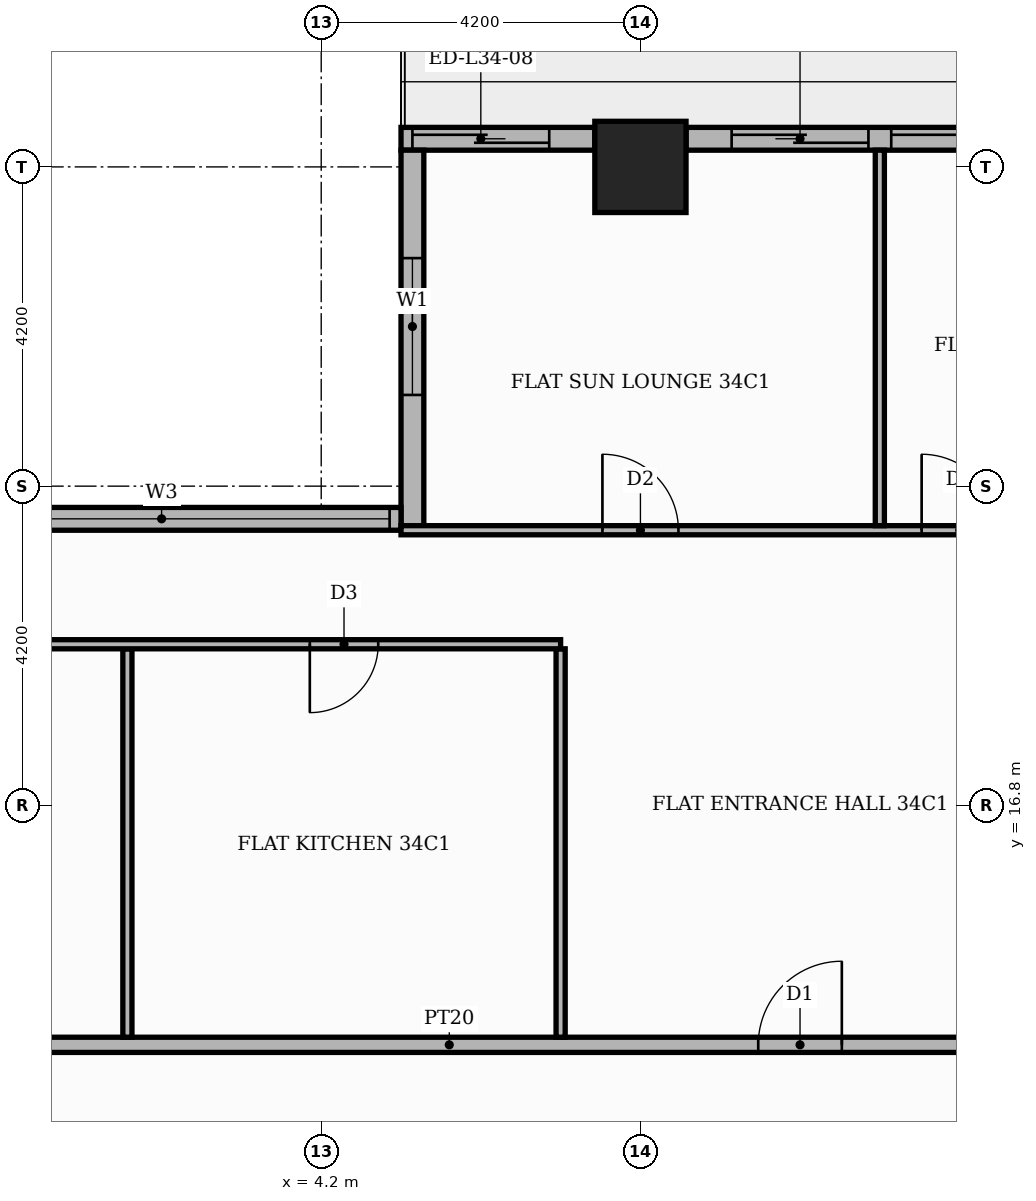
"""IFC4 building model, lengths in metres.
Left out: names, types, materials, properties, quantities, classifications, styles, units other than length and angle.
Written with IfcOpenShell. Run it as: python <this file> out.ifc"""

import sys

from ifc_helpers import new_model, si_unit, direction, frame, frame_2d, origin, origin_2d, place, context, subcontext, project, spatial, rectangle, extrude, element, fill, save


model = new_model("IFC4")
c1 = context("Model", 3, precision=1e-05, world=origin(), true_north=direction((0.0, 1.0)))
c2 = subcontext(c1, "Body", "Model", "MODEL_VIEW")
j1 = project(units=[si_unit("LENGTHUNIT", "METRE"), si_unit("PLANEANGLEUNIT", "RADIAN")], contexts=[c1])
p1 = place(None, origin())
s1 = spatial("IfcSite", under=j1, at=p1, CompositionType="ELEMENT")
p2 = place(p1, origin())
s2 = spatial("IfcBuilding", under=s1, at=p2, CompositionType="ELEMENT")
p3 = place(p2, frame((0.0, 0.0, 145.5)))
s3 = spatial("IfcBuildingStorey", under=s2, at=p3, CompositionType="ELEMENT", Elevation=145.5)
p4 = place(p3, frame((8.4, 25.2, 0.0), z_axis=(0.0, 0.0, 1.0), x_axis=(1.0, 0.0, 0.0)))
e1 = element("IfcColumn", 1, at=p4, inside=s3, PredefinedType="COLUMN", context=c2, shape_type="SweptSolid", body=[
    extrude(rectangle(XDim=1.2, YDim=1.2, at=origin_2d()), origin(), (0.0, 0.0, 1.0), 3.9),
])
p5 = place(p3, frame((16.2, 25.57, 0.0), z_axis=(0.0, 0.0, 1.0), x_axis=(-1.0, 0.0, 0.0)))
e2 = element("IfcWall", 2, at=p5, inside=s3, PredefinedType="STANDARD", context=c2, shape_type="SweptSolid", body=[
    extrude(rectangle(XDim=7.2, YDim=0.3, at=frame_2d((3.6, 0.0))), origin(), (0.0, 0.0, 1.0), 3.48),
])
p6 = place(p5, frame((0.6, 0.0, 0.0)))
e3 = element("IfcOpeningElement", 3, at=p6, cuts=e2, PredefinedType="OPENING", context=c2, shape_type="SweptSolid", body=[
    extrude(rectangle(XDim=3.9, YDim=2.4, at=frame_2d((1.95, 1.2))), frame((0.0, 0.16, 0.0), z_axis=(0.0, -1.0, 0.0), x_axis=(1.0, 0.0, 0.0)), (0.0, 0.0, 1.0), 0.32),
])
p7 = place(p5, frame((4.8, 0.0, 0.0)))
e4 = element("IfcOpeningElement", 4, at=p7, cuts=e2, PredefinedType="OPENING", context=c2, shape_type="SweptSolid", body=[
    extrude(rectangle(XDim=1.8, YDim=2.4, at=frame_2d((0.9, 1.2))), frame((0.0, 0.16, 0.0), z_axis=(0.0, -1.0, 0.0), x_axis=(1.0, 0.0, 0.0)), (0.0, 0.0, 1.0), 0.32),
])
p8 = place(p3, frame((7.8, 25.57, 0.0), z_axis=(0.0, 0.0, 1.0), x_axis=(-1.0, 0.0, 0.0)))
e5 = element("IfcWall", 5, at=p8, inside=s3, PredefinedType="STANDARD", context=c2, shape_type="SweptSolid", body=[
    extrude(rectangle(XDim=2.55, YDim=0.3, at=frame_2d((1.275, 0.0))), origin(), (0.0, 0.0, 1.0), 3.48),
])
p9 = place(p8, frame((0.6, 0.0, 0.0)))
e6 = element("IfcOpeningElement", 6, at=p9, cuts=e5, PredefinedType="OPENING", context=c2, shape_type="SweptSolid", body=[
    extrude(rectangle(XDim=1.8, YDim=2.4, at=frame_2d((0.9, 1.2))), frame((0.0, 0.16, 0.0), z_axis=(0.0, -1.0, 0.0), x_axis=(1.0, 0.0, 0.0)), (0.0, 0.0, 1.0), 0.32),
])
p10 = place(p3, frame((5.4, 25.42, 0.0), z_axis=(0.0, 0.0, 1.0), x_axis=(0.0, -1.0, 0.0)))
e7 = element("IfcWall", 7, at=p10, inside=s3, PredefinedType="STANDARD", context=c2, shape_type="SweptSolid", body=[
    extrude(rectangle(XDim=5.0, YDim=0.3, at=frame_2d((2.5, 0.0))), origin(), (0.0, 0.0, 1.0), 3.48),
])
p11 = place(p10, frame((1.42, 0.0, 0.9)))
e8 = element("IfcOpeningElement", 8, at=p11, cuts=e7, PredefinedType="OPENING", context=c2, shape_type="SweptSolid", body=[
    extrude(rectangle(XDim=1.8, YDim=2.1, at=frame_2d((0.9, 1.05))), frame((0.0, 0.16, 0.0), z_axis=(0.0, -1.0, 0.0), x_axis=(1.0, 0.0, 0.0)), (0.0, 0.0, 1.0), 0.32),
])
p12 = place(p3, frame((5.25, 20.57, 0.0), z_axis=(0.0, 0.0, 1.0), x_axis=(-1.0, 0.0, 0.0)))
e9 = element("IfcWall", 9, at=p12, inside=s3, PredefinedType="STANDARD", context=c2, shape_type="SweptSolid", body=[
    extrude(rectangle(XDim=10.8, YDim=0.3, at=frame_2d((5.4, 0.0))), origin(), (0.0, 0.0, 1.0), 3.48),
])
p13 = place(p12, frame((0.15, 0.0, 0.9)))
e10 = element("IfcOpeningElement", 10, at=p13, cuts=e9, PredefinedType="OPENING", context=c2, shape_type="SweptSolid", body=[
    extrude(rectangle(XDim=6.0, YDim=2.1, at=frame_2d((3.0, 1.05))), frame((0.0, 0.16, 0.0), z_axis=(0.0, -1.0, 0.0), x_axis=(1.0, 0.0, 0.0)), (0.0, 0.0, 1.0), 0.32),
])
p14 = place(p12, frame((6.45, 0.0, 0.9)))
e11 = element("IfcOpeningElement", 11, at=p14, cuts=e9, PredefinedType="OPENING", context=c2, shape_type="SweptSolid", body=[
    extrude(rectangle(XDim=3.9, YDim=2.1, at=frame_2d((1.95, 1.05))), frame((0.0, 0.16, 0.0), z_axis=(0.0, -1.0, 0.0), x_axis=(1.0, 0.0, 0.0)), (0.0, 0.0, 1.0), 0.32),
])
p15 = place(p3, frame((-13.65, 13.65, 0.0), z_axis=(0.0, 0.0, 1.0), x_axis=(1.0, 0.0, 0.0)))
e12 = element("IfcWall", 12, at=p15, inside=s3, PredefinedType="PARTITIONING", context=c2, shape_type="SweptSolid", body=[
    extrude(rectangle(XDim=39.07, YDim=0.2, at=frame_2d((19.535, 0.0))), origin(), (0.0, 0.0, 1.0), 3.48),
])
p16 = place(p15, frame((23.6, 0.0, 0.0)))
e13 = element("IfcOpeningElement", 13, at=p16, cuts=e12, PredefinedType="OPENING", context=c2, shape_type="SweptSolid", body=[
    extrude(rectangle(XDim=1.1, YDim=2.4, at=frame_2d((0.55, 1.2))), frame((0.0, 0.11, 0.0), z_axis=(0.0, -1.0, 0.0), x_axis=(1.0, 0.0, 0.0)), (0.0, 0.0, 1.0), 0.22),
])
for number, where, z_axis, x_axis in (
    (14, (1.65, 13.75, 0.0), (0.0, 0.0, 1.0), (0.0, 1.0, 0.0)),
    (15, (7.35, 13.75, 0.0), (0.0, 0.0, 1.0), (0.0, 1.0, 0.0)),
):
    element("IfcWall", number, at=place(p3, frame(where, z_axis=z_axis, x_axis=x_axis)), inside=s3, PredefinedType="PARTITIONING", context=c2, shape_type="SweptSolid", body=[
        extrude(rectangle(XDim=5.11, YDim=0.12, at=frame_2d((2.555, 0.0))), origin(), (0.0, 0.0, 1.0), 3.48),
    ])
p17 = place(p3, frame((-13.55, 18.92, 0.0), z_axis=(0.0, 0.0, 1.0), x_axis=(1.0, 0.0, 0.0)))
e16 = element("IfcWall", 16, at=p17, inside=s3, PredefinedType="PARTITIONING", context=c2, shape_type="SweptSolid", body=[
    extrude(rectangle(XDim=20.9, YDim=0.12, at=frame_2d((10.45, 0.0))), origin(), (0.0, 0.0, 1.0), 3.48),
])
p18 = place(p17, frame((17.6, 0.0, 0.0)))
e17 = element("IfcOpeningElement", 17, at=p18, cuts=e16, PredefinedType="OPENING", context=c2, shape_type="SweptSolid", body=[
    extrude(rectangle(XDim=0.9, YDim=2.1, at=frame_2d((0.45, 1.05))), frame((0.0, 0.07, 0.0), z_axis=(0.0, -1.0, 0.0), x_axis=(1.0, 0.0, 0.0)), (0.0, 0.0, 1.0), 0.14),
])
p19 = place(p17, frame((11.3, 0.0, 0.0)))
e18 = element("IfcOpeningElement", 18, at=p19, cuts=e16, PredefinedType="OPENING", context=c2, shape_type="SweptSolid", body=[
    extrude(rectangle(XDim=0.9, YDim=2.1, at=frame_2d((0.45, 1.05))), frame((0.0, 0.07, 0.0), z_axis=(0.0, -1.0, 0.0), x_axis=(1.0, 0.0, 0.0)), (0.0, 0.0, 1.0), 0.14),
])
p20 = place(p17, frame((6.65, 0.0, 0.0)))
e19 = element("IfcOpeningElement", 19, at=p20, cuts=e16, PredefinedType="OPENING", context=c2, shape_type="SweptSolid", body=[
    extrude(rectangle(XDim=0.9, YDim=2.1, at=frame_2d((0.45, 1.05))), frame((0.0, 0.07, 0.0), z_axis=(0.0, -1.0, 0.0), x_axis=(1.0, 0.0, 0.0)), (0.0, 0.0, 1.0), 0.14),
])
p21 = place(p17, frame((3.8, 0.0, 0.0)))
e20 = element("IfcOpeningElement", 20, at=p21, cuts=e16, PredefinedType="OPENING", context=c2, shape_type="SweptSolid", body=[
    extrude(rectangle(XDim=0.9, YDim=2.1, at=frame_2d((0.45, 1.05))), frame((0.0, 0.07, 0.0), z_axis=(0.0, -1.0, 0.0), x_axis=(1.0, 0.0, 0.0)), (0.0, 0.0, 1.0), 0.14),
])
p22 = place(p17, frame((0.8, 0.0, 0.0)))
e21 = element("IfcOpeningElement", 21, at=p22, cuts=e16, PredefinedType="OPENING", context=c2, shape_type="SweptSolid", body=[
    extrude(rectangle(XDim=0.9, YDim=2.1, at=frame_2d((0.45, 1.05))), frame((0.0, 0.07, 0.0), z_axis=(0.0, -1.0, 0.0), x_axis=(1.0, 0.0, 0.0)), (0.0, 0.0, 1.0), 0.14),
])
p23 = place(p3, frame((5.25, 20.42, 0.0), z_axis=(0.0, 0.0, 1.0), x_axis=(1.0, 0.0, 0.0)))
e22 = element("IfcWall", 22, at=p23, inside=s3, PredefinedType="PARTITIONING", context=c2, shape_type="SweptSolid", body=[
    extrude(rectangle(XDim=20.17, YDim=0.12, at=frame_2d((10.085, 0.0))), origin(), (0.0, 0.0, 1.0), 3.48),
])
p24 = place(p23, frame((6.85, 0.0, 0.0)))
e23 = element("IfcOpeningElement", 23, at=p24, cuts=e22, PredefinedType="OPENING", context=c2, shape_type="SweptSolid", body=[
    extrude(rectangle(XDim=1.0, YDim=2.1, at=frame_2d((0.5, 1.05))), frame((0.0, 0.07, 0.0), z_axis=(0.0, -1.0, 0.0), x_axis=(1.0, 0.0, 0.0)), (0.0, 0.0, 1.0), 0.14),
])
p25 = place(p23, frame((2.65, 0.0, 0.0)))
e24 = element("IfcOpeningElement", 24, at=p25, cuts=e22, PredefinedType="OPENING", context=c2, shape_type="SweptSolid", body=[
    extrude(rectangle(XDim=1.0, YDim=2.1, at=frame_2d((0.5, 1.05))), frame((0.0, 0.07, 0.0), z_axis=(0.0, -1.0, 0.0), x_axis=(1.0, 0.0, 0.0)), (0.0, 0.0, 1.0), 0.14),
])
p26 = place(p3, frame((11.55, 20.48, 0.0), z_axis=(0.0, 0.0, 1.0), x_axis=(0.0, 1.0, 0.0)))
e25 = element("IfcWall", 25, at=p26, inside=s3, PredefinedType="PARTITIONING", context=c2, shape_type="SweptSolid", body=[
    extrude(rectangle(XDim=4.94, YDim=0.12, at=frame_2d((2.47, 0.0))), origin(), (0.0, 0.0, 1.0), 3.48),
])
p27 = place(p6, origin())
e26 = element("IfcDoor", 26, at=p27, inside=s3, OperationType="SLIDING_TO_LEFT", PredefinedType="DOOR", context=c2, shape_type="SweptSolid", body=[
    extrude(rectangle(XDim=3.9, YDim=2.4, at=frame_2d((1.95, 1.2))), frame((0.0, 0.025, 0.0), z_axis=(0.0, -1.0, 0.0), x_axis=(1.0, 0.0, 0.0)), (0.0, 0.0, 1.0), 0.05),
])
fill(e3, e26)
p28 = place(p7, origin())
e27 = element("IfcDoor", 27, at=p28, inside=s3, OperationType="SLIDING_TO_RIGHT", PredefinedType="DOOR", context=c2, shape_type="SweptSolid", body=[
    extrude(rectangle(XDim=1.8, YDim=2.4, at=frame_2d((0.9, 1.2))), frame((0.0, 0.025, 0.0), z_axis=(0.0, -1.0, 0.0), x_axis=(1.0, 0.0, 0.0)), (0.0, 0.0, 1.0), 0.05),
])
fill(e4, e27)
p29 = place(p9, origin())
e28 = element("IfcDoor", 28, at=p29, inside=s3, OperationType="SLIDING_TO_LEFT", PredefinedType="DOOR", context=c2, shape_type="SweptSolid", body=[
    extrude(rectangle(XDim=1.8, YDim=2.4, at=frame_2d((0.9, 1.2))), frame((0.0, 0.025, 0.0), z_axis=(0.0, -1.0, 0.0), x_axis=(1.0, 0.0, 0.0)), (0.0, 0.0, 1.0), 0.05),
])
fill(e6, e28)
p30 = place(p11, origin())
e29 = element("IfcWindow", 29, at=p30, inside=s3, PartitioningType="SINGLE_PANEL", PredefinedType="WINDOW", context=c2, shape_type="SweptSolid", body=[
    extrude(rectangle(XDim=1.8, YDim=2.1, at=frame_2d((0.9, 1.05))), frame((0.0, 0.03, 0.0), z_axis=(0.0, -1.0, 0.0), x_axis=(1.0, 0.0, 0.0)), (0.0, 0.0, 1.0), 0.06),
])
fill(e8, e29)
p31 = place(p13, origin())
e30 = element("IfcWindow", 30, at=p31, inside=s3, PartitioningType="SINGLE_PANEL", PredefinedType="WINDOW", context=c2, shape_type="SweptSolid", body=[
    extrude(rectangle(XDim=6.0, YDim=2.1, at=frame_2d((3.0, 1.05))), frame((0.0, 0.03, 0.0), z_axis=(0.0, -1.0, 0.0), x_axis=(1.0, 0.0, 0.0)), (0.0, 0.0, 1.0), 0.06),
])
fill(e10, e30)
p32 = place(p16, origin())
e31 = element("IfcDoor", 31, at=p32, inside=s3, OperationType="SINGLE_SWING_RIGHT", PredefinedType="DOOR", context=c2, shape_type="SweptSolid", body=[
    extrude(rectangle(XDim=1.1, YDim=2.4, at=frame_2d((0.55, 1.2))), frame((0.0, 0.025, 0.0), z_axis=(0.0, -1.0, 0.0), x_axis=(1.0, 0.0, 0.0)), (0.0, 0.0, 1.0), 0.05),
])
fill(e13, e31)
p33 = place(p18, frame((0.9, 0.0, 0.0), z_axis=(0.0, 0.0, 1.0), x_axis=(-1.0, 0.0, 0.0)))
e32 = element("IfcDoor", 32, at=p33, inside=s3, OperationType="SINGLE_SWING_LEFT", PredefinedType="DOOR", context=c2, shape_type="SweptSolid", body=[
    extrude(rectangle(XDim=0.9, YDim=2.1, at=frame_2d((0.45, 1.05))), frame((0.0, 0.025, 0.0), z_axis=(0.0, -1.0, 0.0), x_axis=(1.0, 0.0, 0.0)), (0.0, 0.0, 1.0), 0.05),
])
fill(e17, e32)
p34 = place(p24, origin())
e33 = element("IfcDoor", 33, at=p34, inside=s3, OperationType="SINGLE_SWING_LEFT", PredefinedType="DOOR", context=c2, shape_type="SweptSolid", body=[
    extrude(rectangle(XDim=1.0, YDim=2.1, at=frame_2d((0.5, 1.05))), frame((0.0, 0.025, 0.0), z_axis=(0.0, -1.0, 0.0), x_axis=(1.0, 0.0, 0.0)), (0.0, 0.0, 1.0), 0.05),
])
fill(e23, e33)
p35 = place(p25, origin())
e34 = element("IfcDoor", 34, at=p35, inside=s3, OperationType="SINGLE_SWING_LEFT", PredefinedType="DOOR", context=c2, shape_type="SweptSolid", body=[
    extrude(rectangle(XDim=1.0, YDim=2.1, at=frame_2d((0.5, 1.05))), frame((0.0, 0.025, 0.0), z_axis=(0.0, -1.0, 0.0), x_axis=(1.0, 0.0, 0.0)), (0.0, 0.0, 1.0), 0.05),
])
fill(e24, e34)
save(model, sys.argv[1])
